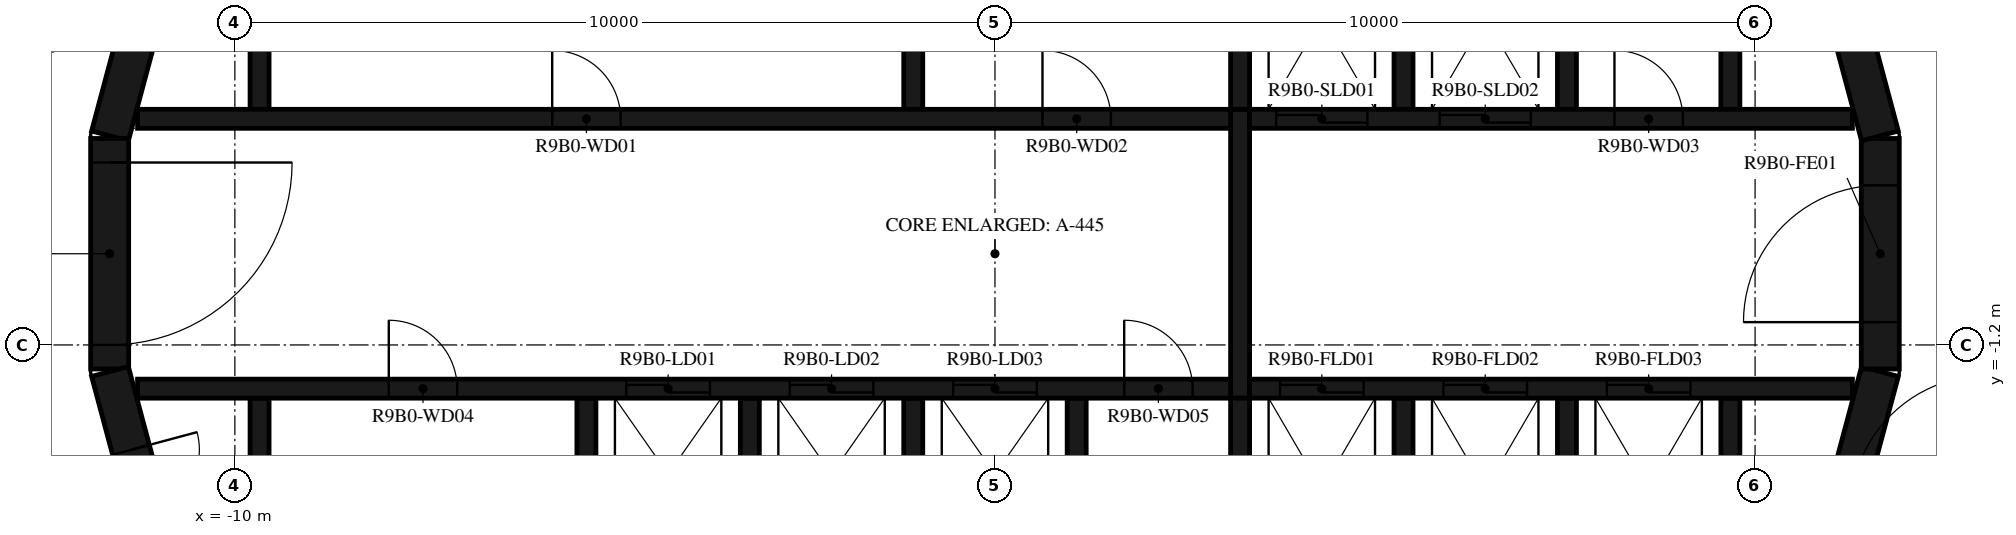
"""IFC4 building model, lengths in metres.
Left out: names, types, materials, properties, quantities, classifications, styles, units other than length and angle.
Written with IfcOpenShell. Run it as: python <this file> out.ifc"""

import sys

from ifc_helpers import new_model, si_unit, direction, frame, frame_2d, origin, place, context, subcontext, project, spatial, polyline, rectangle, outline, extrude, element, fill, save


model = new_model("IFC4")
c1 = context("Model", 3, precision=1e-05, world=origin(), true_north=direction((0.0, 1.0)))
c2 = subcontext(c1, "Body", "Model", "MODEL_VIEW")
j1 = project(units=[si_unit("LENGTHUNIT", "METRE"), si_unit("PLANEANGLEUNIT", "RADIAN")], contexts=[c1])
p1 = place(None, origin())
s1 = spatial("IfcSite", under=j1, at=p1, CompositionType="ELEMENT")
p2 = place(p1, origin())
s2 = spatial("IfcBuilding", under=s1, at=p2, CompositionType="ELEMENT")
p3 = place(p2, frame((0.0, 0.0, 347.0)))
s3 = spatial("IfcBuildingStorey", under=s2, at=p3, CompositionType="ELEMENT", Elevation=347.0)
p4 = place(p3, frame((10.858, -4.479, 0.0), z_axis=(0.0, 0.0, 1.0), x_axis=(0.258734743916, 0.965948410781, 0.0)))
e1 = element("IfcWall", 1, at=p4, inside=s3, PredefinedType="SHEAR", context=c2, shape_type="SweptSolid", body=[
    extrude(rectangle(XDim=3.033, YDim=0.5, at=frame_2d((1.516, 0.0))), origin(), (0.0, 0.0, 1.0), 3.12),
])
p5 = place(p3, frame((11.647, -1.516, 0.0), z_axis=(0.0, 0.0, 1.0), x_axis=(0.0, 1.0, 0.0)))
e2 = element("IfcWall", 2, at=p5, inside=s3, PredefinedType="SHEAR", context=c2, shape_type="SweptSolid", body=[
    extrude(rectangle(XDim=3.033, YDim=0.5, at=frame_2d((1.516, 0.0))), origin(), (0.0, 0.0, 1.0), 3.12),
])
p6 = place(p5, frame((0.616, 0.0, 0.0)))
e3 = element("IfcOpeningElement", 3, at=p6, cuts=e2, PredefinedType="OPENING", context=c2, shape_type="SweptSolid", body=[
    extrude(rectangle(XDim=1.8, YDim=2.1, at=frame_2d((0.9, 1.05))), frame((0.0, 0.26, 0.0), z_axis=(0.0, -1.0, 0.0), x_axis=(1.0, 0.0, 0.0)), (0.0, 0.0, 1.0), 0.52),
])
for number, where, z_axis, x_axis in (
    (4, (11.643, 1.55, 0.0), (0.0, 0.0, 1.0), (-0.259, 0.966, 0.0)),
    (5, (-10.858, 4.479, 0.0), (0.0, 0.0, 1.0), (-0.259, -0.966, 0.0)),
):
    element("IfcWall", number, at=place(p3, frame(where, z_axis=z_axis, x_axis=x_axis)), inside=s3, PredefinedType="SHEAR", context=c2, shape_type="SweptSolid", body=[
        extrude(rectangle(XDim=3.033, YDim=0.5, at=frame_2d((1.516, 0.0))), origin(), (0.0, 0.0, 1.0), 3.12),
    ])
p7 = place(p3, frame((-11.647, 1.516, 0.0), z_axis=(0.0, 0.0, 1.0), x_axis=(0.0, -1.0, 0.0)))
e6 = element("IfcWall", 6, at=p7, inside=s3, PredefinedType="SHEAR", context=c2, shape_type="SweptSolid", body=[
    extrude(rectangle(XDim=3.033, YDim=0.5, at=frame_2d((1.516, 0.0))), origin(), (0.0, 0.0, 1.0), 3.12),
])
p8 = place(p7, frame((0.316, 0.0, 0.0)))
e7 = element("IfcOpeningElement", 7, at=p8, cuts=e6, PredefinedType="OPENING", context=c2, shape_type="SweptSolid", body=[
    extrude(rectangle(XDim=2.4, YDim=2.1, at=frame_2d((1.2, 1.05))), frame((0.0, 0.26, 0.0), z_axis=(0.0, -1.0, 0.0), x_axis=(1.0, 0.0, 0.0)), (0.0, 0.0, 1.0), 0.52),
])
p9 = place(p3, frame((-11.643, -1.55, 0.0), z_axis=(0.0, 0.0, 1.0), x_axis=(0.258734743916, -0.965948410781, 0.0)))
e8 = element("IfcWall", 8, at=p9, inside=s3, PredefinedType="SHEAR", context=c2, shape_type="SweptSolid", body=[
    extrude(rectangle(XDim=3.033, YDim=0.5, at=frame_2d((1.516, 0.0))), origin(), (0.0, 0.0, 1.0), 3.12),
])
p10 = place(p9, frame((1.066, 0.0, 0.0)))
e9 = element("IfcOpeningElement", 9, at=p10, cuts=e8, PredefinedType="OPENING", context=c2, shape_type="SweptSolid", body=[
    extrude(rectangle(XDim=0.9, YDim=2.1, at=frame_2d((0.45, 1.05))), frame((0.0, 0.26, 0.0), z_axis=(0.0, -1.0, 0.0), x_axis=(1.0, 0.0, 0.0)), (0.0, 0.0, 1.0), 0.52),
])
p11 = place(p3, origin())
e10 = element("IfcWall", 10, at=p11, inside=s3, PredefinedType="SHEAR", context=c2, shape_type="SweptSolid", body=[
    extrude(outline(polyline([(-9.8, 1.9), (-9.55, 1.9), (-9.55, 4.8), (-1.2, 4.8), (-1.2, 1.9), (-0.95, 1.9), (-0.95, 4.8), (3.1, 4.8), (3.1, 1.9), (3.35, 1.9), (3.35, 4.8), (5.25, 4.8), (5.25, 1.9), (5.5, 1.9), (5.5, 4.8), (7.4, 4.8), (7.4, 1.9), (7.65, 1.9), (7.65, 4.8), (9.55, 4.8), (9.55, 1.9), (9.8, 1.9), (9.8, 4.8), (9.8, 5.05), (-9.8, 5.05), (-9.8, 4.8), (-9.8, 1.9)])), origin(), (0.0, 0.0, 1.0), 3.12),
])
p12 = place(p3, origin())
e11 = element("IfcWall", 11, at=p12, inside=s3, PredefinedType="SHEAR", context=c2, shape_type="SweptSolid", body=[
    extrude(outline(polyline([(9.8, -5.05), (9.8, -4.8), (9.8, -1.9), (9.55, -1.9), (9.55, -4.8), (7.65, -4.8), (7.65, -1.9), (7.4, -1.9), (7.4, -4.8), (5.5, -4.8), (5.5, -1.9), (5.25, -1.9), (5.25, -4.8), (3.35, -4.8), (3.35, -1.9), (3.1, -1.9), (3.1, -4.8), (1.2, -4.8), (1.2, -1.9), (0.95, -1.9), (0.95, -4.8), (-0.95, -4.8), (-0.95, -1.9), (-1.2, -1.9), (-1.2, -4.8), (-3.1, -4.8), (-3.1, -1.9), (-3.35, -1.9), (-3.35, -4.8), (-5.25, -4.8), (-5.25, -1.9), (-5.5, -1.9), (-5.5, -4.8), (-9.55, -4.8), (-9.55, -1.9), (-9.8, -1.9), (-9.8, -4.8), (-9.8, -5.05), (9.8, -5.05)])), origin(), (0.0, 0.0, 1.0), 3.12),
])
p13 = place(p3, frame((-11.28, 1.775, 0.0), z_axis=(0.0, 0.0, 1.0), x_axis=(1.0, 0.0, 0.0)))
e12 = element("IfcWall", 12, at=p13, inside=s3, PredefinedType="SHEAR", context=c2, shape_type="SweptSolid", body=[
    extrude(rectangle(XDim=14.38, YDim=0.25, at=frame_2d((7.19, 0.0))), origin(), (0.0, 0.0, 1.0), 3.12),
])
p14 = place(p13, frame((5.455, 0.0, 0.0)))
e13 = element("IfcOpeningElement", 13, at=p14, cuts=e12, PredefinedType="OPENING", context=c2, shape_type="SweptSolid", body=[
    extrude(rectangle(XDim=0.9, YDim=2.1, at=frame_2d((0.45, 1.05))), frame((0.0, 0.135, 0.0), z_axis=(0.0, -1.0, 0.0), x_axis=(1.0, 0.0, 0.0)), (0.0, 0.0, 1.0), 0.27),
])
p15 = place(p13, frame((11.905, 0.0, 0.0)))
e14 = element("IfcOpeningElement", 14, at=p15, cuts=e12, PredefinedType="OPENING", context=c2, shape_type="SweptSolid", body=[
    extrude(rectangle(XDim=0.9, YDim=2.1, at=frame_2d((0.45, 1.05))), frame((0.0, 0.135, 0.0), z_axis=(0.0, -1.0, 0.0), x_axis=(1.0, 0.0, 0.0)), (0.0, 0.0, 1.0), 0.27),
])
p16 = place(p3, frame((3.35, 1.775, 0.0), z_axis=(0.0, 0.0, 1.0), x_axis=(1.0, 0.0, 0.0)))
e15 = element("IfcWall", 15, at=p16, inside=s3, PredefinedType="SHEAR", context=c2, shape_type="SweptSolid", body=[
    extrude(rectangle(XDim=7.93, YDim=0.25, at=frame_2d((3.965, 0.0))), origin(), (0.0, 0.0, 1.0), 3.12),
])
p17 = place(p16, frame((0.35, 0.0, 0.0)))
e16 = element("IfcOpeningElement", 16, at=p17, cuts=e15, PredefinedType="OPENING", context=c2, shape_type="SweptSolid", body=[
    extrude(rectangle(XDim=1.2, YDim=2.4, at=frame_2d((0.6, 1.2))), frame((0.0, 0.135, 0.0), z_axis=(0.0, -1.0, 0.0), x_axis=(1.0, 0.0, 0.0)), (0.0, 0.0, 1.0), 0.27),
])
p18 = place(p16, frame((2.5, 0.0, 0.0)))
e17 = element("IfcOpeningElement", 17, at=p18, cuts=e15, PredefinedType="OPENING", context=c2, shape_type="SweptSolid", body=[
    extrude(rectangle(XDim=1.2, YDim=2.4, at=frame_2d((0.6, 1.2))), frame((0.0, 0.135, 0.0), z_axis=(0.0, -1.0, 0.0), x_axis=(1.0, 0.0, 0.0)), (0.0, 0.0, 1.0), 0.27),
])
p19 = place(p16, frame((4.8, 0.0, 0.0)))
e18 = element("IfcOpeningElement", 18, at=p19, cuts=e15, PredefinedType="OPENING", context=c2, shape_type="SweptSolid", body=[
    extrude(rectangle(XDim=0.9, YDim=2.1, at=frame_2d((0.45, 1.05))), frame((0.0, 0.135, 0.0), z_axis=(0.0, -1.0, 0.0), x_axis=(1.0, 0.0, 0.0)), (0.0, 0.0, 1.0), 0.27),
])
p20 = place(p3, frame((-11.28, -1.775, 0.0), z_axis=(0.0, 0.0, 1.0), x_axis=(1.0, 0.0, 0.0)))
e19 = element("IfcWall", 19, at=p20, inside=s3, PredefinedType="SHEAR", context=c2, shape_type="SweptSolid", body=[
    extrude(rectangle(XDim=14.38, YDim=0.25, at=frame_2d((7.19, 0.0))), origin(), (0.0, 0.0, 1.0), 3.12),
])
p21 = place(p20, frame((6.43, 0.0, 0.0)))
e20 = element("IfcOpeningElement", 20, at=p21, cuts=e19, PredefinedType="OPENING", context=c2, shape_type="SweptSolid", body=[
    extrude(rectangle(XDim=1.1, YDim=2.1, at=frame_2d((0.55, 1.05))), frame((0.0, 0.135, 0.0), z_axis=(0.0, -1.0, 0.0), x_axis=(1.0, 0.0, 0.0)), (0.0, 0.0, 1.0), 0.27),
])
p22 = place(p20, frame((8.58, 0.0, 0.0)))
e21 = element("IfcOpeningElement", 21, at=p22, cuts=e19, PredefinedType="OPENING", context=c2, shape_type="SweptSolid", body=[
    extrude(rectangle(XDim=1.1, YDim=2.1, at=frame_2d((0.55, 1.05))), frame((0.0, 0.135, 0.0), z_axis=(0.0, -1.0, 0.0), x_axis=(1.0, 0.0, 0.0)), (0.0, 0.0, 1.0), 0.27),
])
p23 = place(p20, frame((10.73, 0.0, 0.0)))
e22 = element("IfcOpeningElement", 22, at=p23, cuts=e19, PredefinedType="OPENING", context=c2, shape_type="SweptSolid", body=[
    extrude(rectangle(XDim=1.1, YDim=2.1, at=frame_2d((0.55, 1.05))), frame((0.0, 0.135, 0.0), z_axis=(0.0, -1.0, 0.0), x_axis=(1.0, 0.0, 0.0)), (0.0, 0.0, 1.0), 0.27),
])
p24 = place(p20, frame((3.305, 0.0, 0.0)))
e23 = element("IfcOpeningElement", 23, at=p24, cuts=e19, PredefinedType="OPENING", context=c2, shape_type="SweptSolid", body=[
    extrude(rectangle(XDim=0.9, YDim=2.1, at=frame_2d((0.45, 1.05))), frame((0.0, 0.135, 0.0), z_axis=(0.0, -1.0, 0.0), x_axis=(1.0, 0.0, 0.0)), (0.0, 0.0, 1.0), 0.27),
])
p25 = place(p20, frame((12.98, 0.0, 0.0)))
e24 = element("IfcOpeningElement", 24, at=p25, cuts=e19, PredefinedType="OPENING", context=c2, shape_type="SweptSolid", body=[
    extrude(rectangle(XDim=0.9, YDim=2.1, at=frame_2d((0.45, 1.05))), frame((0.0, 0.135, 0.0), z_axis=(0.0, -1.0, 0.0), x_axis=(1.0, 0.0, 0.0)), (0.0, 0.0, 1.0), 0.27),
])
p26 = place(p3, frame((3.35, -1.775, 0.0), z_axis=(0.0, 0.0, 1.0), x_axis=(1.0, 0.0, 0.0)))
e25 = element("IfcWall", 25, at=p26, inside=s3, PredefinedType="SHEAR", context=c2, shape_type="SweptSolid", body=[
    extrude(rectangle(XDim=7.93, YDim=0.25, at=frame_2d((3.965, 0.0))), origin(), (0.0, 0.0, 1.0), 3.12),
])
p27 = place(p26, frame((0.4, 0.0, 0.0)))
e26 = element("IfcOpeningElement", 26, at=p27, cuts=e25, PredefinedType="OPENING", context=c2, shape_type="SweptSolid", body=[
    extrude(rectangle(XDim=1.1, YDim=2.4, at=frame_2d((0.55, 1.2))), frame((0.0, 0.135, 0.0), z_axis=(0.0, -1.0, 0.0), x_axis=(1.0, 0.0, 0.0)), (0.0, 0.0, 1.0), 0.27),
])
p28 = place(p26, frame((2.55, 0.0, 0.0)))
e27 = element("IfcOpeningElement", 27, at=p28, cuts=e25, PredefinedType="OPENING", context=c2, shape_type="SweptSolid", body=[
    extrude(rectangle(XDim=1.1, YDim=2.4, at=frame_2d((0.55, 1.2))), frame((0.0, 0.135, 0.0), z_axis=(0.0, -1.0, 0.0), x_axis=(1.0, 0.0, 0.0)), (0.0, 0.0, 1.0), 0.27),
])
p29 = place(p26, frame((4.7, 0.0, 0.0)))
e28 = element("IfcOpeningElement", 28, at=p29, cuts=e25, PredefinedType="OPENING", context=c2, shape_type="SweptSolid", body=[
    extrude(rectangle(XDim=1.1, YDim=2.4, at=frame_2d((0.55, 1.2))), frame((0.0, 0.135, 0.0), z_axis=(0.0, -1.0, 0.0), x_axis=(1.0, 0.0, 0.0)), (0.0, 0.0, 1.0), 0.27),
])
p30 = place(p3, frame((3.225, -1.9, 0.0), z_axis=(0.0, 0.0, 1.0), x_axis=(0.0, 1.0, 0.0)))
e29 = element("IfcWall", 29, at=p30, inside=s3, PredefinedType="SHEAR", context=c2, shape_type="SweptSolid", body=[
    extrude(rectangle(XDim=3.8, YDim=0.25, at=frame_2d((1.9, 0.0))), origin(), (0.0, 0.0, 1.0), 3.12),
])
p31 = place(p3, frame((13.769, 1.691, 0.0), z_axis=(0.0, 0.0, 1.0), x_axis=(-0.374618189599, 0.92717916932, 0.0)))
e30 = element("IfcWall", 30, at=p31, inside=s3, PredefinedType="STANDARD", context=c2, shape_type="SweptSolid", body=[
    extrude(rectangle(XDim=7.181, YDim=0.2, at=frame_2d((3.591, 0.0))), origin(), (0.0, 0.0, 1.0), 3.12),
])
p32 = place(p31, frame((2.371, 0.0, 0.0)))
e31 = element("IfcOpeningElement", 31, at=p32, cuts=e30, PredefinedType="OPENING", context=c2, shape_type="SweptSolid", body=[
    extrude(rectangle(XDim=1.0, YDim=2.1, at=frame_2d((0.5, 1.05))), frame((0.0, 0.11, 0.0), z_axis=(0.0, -1.0, 0.0), x_axis=(1.0, 0.0, 0.0)), (0.0, 0.0, 1.0), 0.22),
])
p33 = place(p3, frame((-13.769, -1.691, 0.0), z_axis=(0.0, 0.0, 1.0), x_axis=(0.372720094028, -0.927943819155, 0.0)))
e32 = element("IfcWall", 32, at=p33, inside=s3, PredefinedType="STANDARD", context=c2, shape_type="SweptSolid", body=[
    extrude(rectangle(XDim=4.875, YDim=0.2, at=frame_2d((2.438, 0.0))), origin(), (0.0, 0.0, 1.0), 3.12),
])
p34 = place(p8, origin())
e33 = element("IfcDoor", 33, at=p34, inside=s3, OperationType="DOUBLE_DOOR_SINGLE_SWING", PredefinedType="DOOR", context=c2, shape_type="SweptSolid", body=[
    extrude(rectangle(XDim=2.4, YDim=2.1, at=frame_2d((1.2, 1.05))), frame((0.0, 0.025, 0.0), z_axis=(0.0, -1.0, 0.0), x_axis=(1.0, 0.0, 0.0)), (0.0, 0.0, 1.0), 0.05),
])
fill(e7, e33)
p35 = place(p6, origin())
e34 = element("IfcDoor", 34, at=p35, inside=s3, OperationType="DOUBLE_DOOR_SINGLE_SWING", PredefinedType="DOOR", context=c2, shape_type="SweptSolid", body=[
    extrude(rectangle(XDim=1.8, YDim=2.1, at=frame_2d((0.9, 1.05))), frame((0.0, 0.025, 0.0), z_axis=(0.0, -1.0, 0.0), x_axis=(1.0, 0.0, 0.0)), (0.0, 0.0, 1.0), 0.05),
])
fill(e3, e34)
p36 = place(p17, origin())
e35 = element("IfcDoor", 35, at=p36, inside=s3, OperationType="DOUBLE_DOOR_SLIDING", PredefinedType="DOOR", context=c2, shape_type="SweptSolid", body=[
    extrude(rectangle(XDim=1.2, YDim=2.4, at=frame_2d((0.6, 1.2))), frame((0.0, 0.025, 0.0), z_axis=(0.0, -1.0, 0.0), x_axis=(1.0, 0.0, 0.0)), (0.0, 0.0, 1.0), 0.05),
])
fill(e16, e35)
p37 = place(p18, origin())
e36 = element("IfcDoor", 36, at=p37, inside=s3, OperationType="DOUBLE_DOOR_SLIDING", PredefinedType="DOOR", context=c2, shape_type="SweptSolid", body=[
    extrude(rectangle(XDim=1.2, YDim=2.4, at=frame_2d((0.6, 1.2))), frame((0.0, 0.025, 0.0), z_axis=(0.0, -1.0, 0.0), x_axis=(1.0, 0.0, 0.0)), (0.0, 0.0, 1.0), 0.05),
])
fill(e17, e36)
p38 = place(p21, origin())
e37 = element("IfcDoor", 37, at=p38, inside=s3, OperationType="DOUBLE_DOOR_SLIDING", PredefinedType="DOOR", context=c2, shape_type="SweptSolid", body=[
    extrude(rectangle(XDim=1.1, YDim=2.1, at=frame_2d((0.55, 1.05))), frame((0.0, 0.025, 0.0), z_axis=(0.0, -1.0, 0.0), x_axis=(1.0, 0.0, 0.0)), (0.0, 0.0, 1.0), 0.05),
])
fill(e20, e37)
p39 = place(p22, origin())
e38 = element("IfcDoor", 38, at=p39, inside=s3, OperationType="DOUBLE_DOOR_SLIDING", PredefinedType="DOOR", context=c2, shape_type="SweptSolid", body=[
    extrude(rectangle(XDim=1.1, YDim=2.1, at=frame_2d((0.55, 1.05))), frame((0.0, 0.025, 0.0), z_axis=(0.0, -1.0, 0.0), x_axis=(1.0, 0.0, 0.0)), (0.0, 0.0, 1.0), 0.05),
])
fill(e21, e38)
p40 = place(p23, origin())
e39 = element("IfcDoor", 39, at=p40, inside=s3, OperationType="DOUBLE_DOOR_SLIDING", PredefinedType="DOOR", context=c2, shape_type="SweptSolid", body=[
    extrude(rectangle(XDim=1.1, YDim=2.1, at=frame_2d((0.55, 1.05))), frame((0.0, 0.025, 0.0), z_axis=(0.0, -1.0, 0.0), x_axis=(1.0, 0.0, 0.0)), (0.0, 0.0, 1.0), 0.05),
])
fill(e22, e39)
p41 = place(p27, origin())
e40 = element("IfcDoor", 40, at=p41, inside=s3, OperationType="DOUBLE_DOOR_SLIDING", PredefinedType="DOOR", context=c2, shape_type="SweptSolid", body=[
    extrude(rectangle(XDim=1.1, YDim=2.4, at=frame_2d((0.55, 1.2))), frame((0.0, 0.025, 0.0), z_axis=(0.0, -1.0, 0.0), x_axis=(1.0, 0.0, 0.0)), (0.0, 0.0, 1.0), 0.05),
])
fill(e26, e40)
p42 = place(p28, origin())
e41 = element("IfcDoor", 41, at=p42, inside=s3, OperationType="DOUBLE_DOOR_SLIDING", PredefinedType="DOOR", context=c2, shape_type="SweptSolid", body=[
    extrude(rectangle(XDim=1.1, YDim=2.4, at=frame_2d((0.55, 1.2))), frame((0.0, 0.025, 0.0), z_axis=(0.0, -1.0, 0.0), x_axis=(1.0, 0.0, 0.0)), (0.0, 0.0, 1.0), 0.05),
])
fill(e27, e41)
p43 = place(p29, origin())
e42 = element("IfcDoor", 42, at=p43, inside=s3, OperationType="DOUBLE_DOOR_SLIDING", PredefinedType="DOOR", context=c2, shape_type="SweptSolid", body=[
    extrude(rectangle(XDim=1.1, YDim=2.4, at=frame_2d((0.55, 1.2))), frame((0.0, 0.025, 0.0), z_axis=(0.0, -1.0, 0.0), x_axis=(1.0, 0.0, 0.0)), (0.0, 0.0, 1.0), 0.05),
])
fill(e28, e42)
p44 = place(p14, origin())
e43 = element("IfcDoor", 43, at=p44, inside=s3, OperationType="SINGLE_SWING_LEFT", PredefinedType="DOOR", context=c2, shape_type="SweptSolid", body=[
    extrude(rectangle(XDim=0.9, YDim=2.1, at=frame_2d((0.45, 1.05))), frame((0.0, 0.025, 0.0), z_axis=(0.0, -1.0, 0.0), x_axis=(1.0, 0.0, 0.0)), (0.0, 0.0, 1.0), 0.05),
])
fill(e13, e43)
p45 = place(p15, origin())
e44 = element("IfcDoor", 44, at=p45, inside=s3, OperationType="SINGLE_SWING_RIGHT", PredefinedType="DOOR", context=c2, shape_type="SweptSolid", body=[
    extrude(rectangle(XDim=0.9, YDim=2.1, at=frame_2d((0.45, 1.05))), frame((0.0, 0.025, 0.0), z_axis=(0.0, -1.0, 0.0), x_axis=(1.0, 0.0, 0.0)), (0.0, 0.0, 1.0), 0.05),
])
fill(e14, e44)
p46 = place(p19, origin())
e45 = element("IfcDoor", 45, at=p46, inside=s3, OperationType="SINGLE_SWING_LEFT", PredefinedType="DOOR", context=c2, shape_type="SweptSolid", body=[
    extrude(rectangle(XDim=0.9, YDim=2.1, at=frame_2d((0.45, 1.05))), frame((0.0, 0.025, 0.0), z_axis=(0.0, -1.0, 0.0), x_axis=(1.0, 0.0, 0.0)), (0.0, 0.0, 1.0), 0.05),
])
fill(e18, e45)
p47 = place(p24, origin())
e46 = element("IfcDoor", 46, at=p47, inside=s3, OperationType="SINGLE_SWING_RIGHT", PredefinedType="DOOR", context=c2, shape_type="SweptSolid", body=[
    extrude(rectangle(XDim=0.9, YDim=2.1, at=frame_2d((0.45, 1.05))), frame((0.0, 0.025, 0.0), z_axis=(0.0, -1.0, 0.0), x_axis=(1.0, 0.0, 0.0)), (0.0, 0.0, 1.0), 0.05),
])
fill(e23, e46)
p48 = place(p25, origin())
e47 = element("IfcDoor", 47, at=p48, inside=s3, OperationType="SINGLE_SWING_LEFT", PredefinedType="DOOR", context=c2, shape_type="SweptSolid", body=[
    extrude(rectangle(XDim=0.9, YDim=2.1, at=frame_2d((0.45, 1.05))), frame((0.0, 0.025, 0.0), z_axis=(0.0, -1.0, 0.0), x_axis=(1.0, 0.0, 0.0)), (0.0, 0.0, 1.0), 0.05),
])
fill(e24, e47)
p49 = place(p10, origin())
e48 = element("IfcDoor", 48, at=p49, inside=s3, OperationType="SINGLE_SWING_RIGHT", PredefinedType="DOOR", context=c2, shape_type="SweptSolid", body=[
    extrude(rectangle(XDim=0.9, YDim=2.1, at=frame_2d((0.45, 1.05))), frame((0.0, 0.025, 0.0), z_axis=(0.0, -1.0, 0.0), x_axis=(1.0, 0.0, 0.0)), (0.0, 0.0, 1.0), 0.05),
])
fill(e9, e48)
save(model, sys.argv[1])
